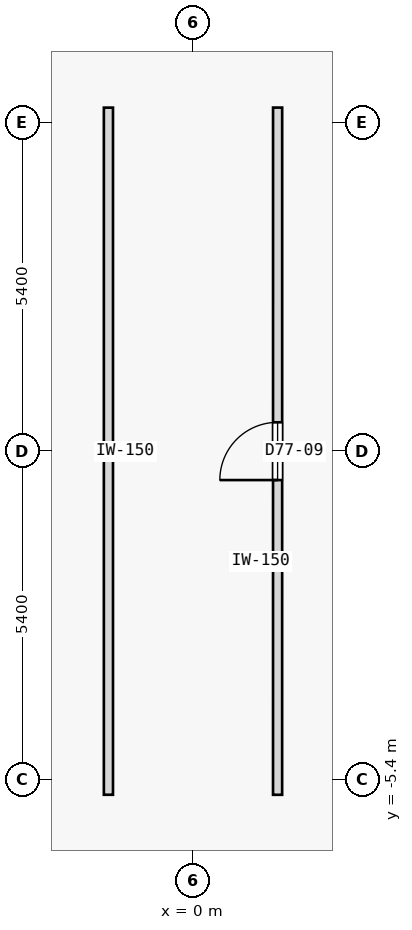
"""IFC4 building model, lengths in metres.
Left out: names, types, materials, properties, quantities, classifications, styles, units other than length and angle.
Written with IfcOpenShell. Run it as: python <this file> out.ifc"""

import sys

from ifc_helpers import new_model, si_unit, direction, frame, frame_2d, origin, place, context, subcontext, project, spatial, rectangle, extrude, element, fill, save


model = new_model("IFC4")
c1 = context("Model", 3, precision=1e-05, world=origin(), true_north=direction((0.0, 1.0)))
c2 = subcontext(c1, "Body", "Model", "MODEL_VIEW")
j1 = project(units=[si_unit("LENGTHUNIT", "METRE"), si_unit("PLANEANGLEUNIT", "RADIAN")], contexts=[c1])
p1 = place(None, origin())
s1 = spatial("IfcSite", under=j1, at=p1, CompositionType="ELEMENT")
p2 = place(p1, origin())
s2 = spatial("IfcBuilding", under=s1, at=p2, CompositionType="ELEMENT")
p3 = place(p2, frame((0.0, 0.0, 288.6)))
s3 = spatial("IfcBuildingStorey", under=s2, at=p3, CompositionType="ELEMENT", Elevation=288.6)
p4 = place(p3, frame((-1.391, -5.65, 0.0), z_axis=(0.0, 0.0, 1.0), x_axis=(-2.1605738e-05, 0.999999999767, 0.0)))
e1 = element("IfcWall", 1, at=p4, inside=s3, PredefinedType="PARTITIONING", context=c2, shape_type="SweptSolid", body=[
    extrude(rectangle(XDim=11.3, YDim=0.15, at=frame_2d((5.65, 0.0))), origin(), (0.0, 0.0, 1.0), 3.125),
])
p5 = place(p3, frame((1.391, -5.65, 0.0), z_axis=(0.0, 0.0, 1.0), x_axis=(4.3206809e-05, 0.999999999067, 0.0)))
e2 = element("IfcWall", 2, at=p5, inside=s3, PredefinedType="PARTITIONING", context=c2, shape_type="SweptSolid", body=[
    extrude(rectangle(XDim=11.301, YDim=0.15, at=frame_2d((5.65, 0.0))), origin(), (0.0, 0.0, 1.0), 3.125),
])
p6 = place(p5, frame((5.176, 0.0, 0.0)))
e3 = element("IfcOpeningElement", 3, at=p6, cuts=e2, PredefinedType="OPENING", context=c2, shape_type="SweptSolid", body=[
    extrude(rectangle(XDim=0.95, YDim=2.15, at=frame_2d((0.475, 1.075))), frame((0.0, 0.085, 0.0), z_axis=(0.0, -1.0, 0.0), x_axis=(1.0, 0.0, 0.0)), (0.0, 0.0, 1.0), 0.17),
])
p7 = place(p3, frame((-17.499, 6.038, 0.0), z_axis=(0.0, 0.0, 1.0), x_axis=(0.913541623157, 0.406745255362, 0.0)))
e4 = element("IfcWall", 4, at=p7, inside=s3, PredefinedType="PARTITIONING", context=c2, shape_type="SweptSolid", body=[
    extrude(rectangle(XDim=17.879, YDim=0.15, at=frame_2d((8.939, 0.0))), origin(), (0.0, 0.0, 1.0), 3.125),
])
p8 = place(p7, frame((8.465, 0.0, 0.0)))
e5 = element("IfcOpeningElement", 5, at=p8, cuts=e4, PredefinedType="OPENING", context=c2, shape_type="SweptSolid", body=[
    extrude(rectangle(XDim=0.95, YDim=2.15, at=frame_2d((0.475, 1.075))), frame((0.0, 0.085, 0.0), z_axis=(0.0, -1.0, 0.0), x_axis=(1.0, 0.0, 0.0)), (0.0, 0.0, 1.0), 0.17),
])
p9 = place(p6, origin())
e6 = element("IfcDoor", 6, at=p9, inside=s3, OperationType="SINGLE_SWING_LEFT", PredefinedType="DOOR", context=c2, shape_type="SweptSolid", body=[
    extrude(rectangle(XDim=0.95, YDim=2.15, at=frame_2d((0.475, 1.075))), frame((0.0, 0.025, 0.0), z_axis=(0.0, -1.0, 0.0), x_axis=(1.0, 0.0, 0.0)), (0.0, 0.0, 1.0), 0.05),
])
fill(e3, e6)
save(model, sys.argv[1])
